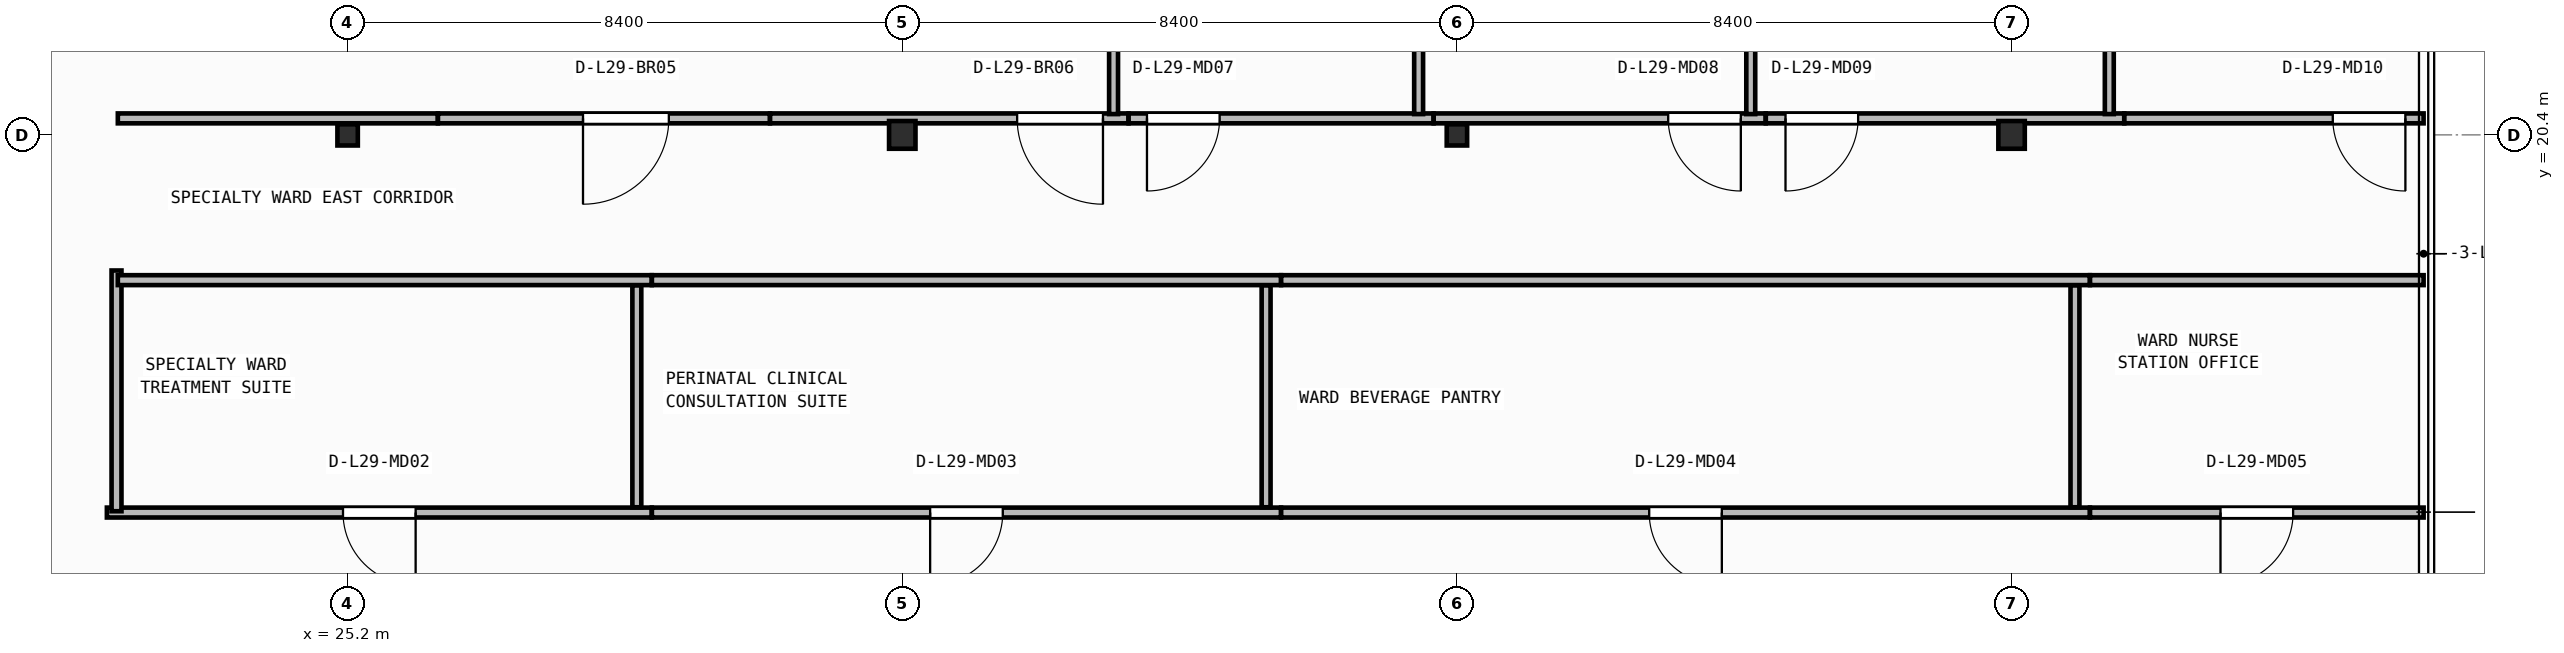
"""IFC4 building model, lengths in metres.
Left out: names, types, materials, properties, quantities, classifications, styles, units other than length and angle.
Written with IfcOpenShell. Run it as: python <this file> out.ifc"""

import sys

from ifc_helpers import new_model, si_unit, direction, frame, frame_2d, origin, origin_2d, place, context, subcontext, project, spatial, rectangle, i_section, extrude, element, fill, save


model = new_model("IFC4")
c1 = context("Model", 3, precision=1e-05, world=origin(), true_north=direction((0.0, 1.0)))
c2 = subcontext(c1, "Body", "Model", "MODEL_VIEW")
j1 = project(units=[si_unit("LENGTHUNIT", "METRE"), si_unit("PLANEANGLEUNIT", "RADIAN")], contexts=[c1])
p1 = place(None, origin())
s1 = spatial("IfcSite", under=j1, at=p1, CompositionType="ELEMENT")
p2 = place(p1, origin())
s2 = spatial("IfcBuilding", under=s1, at=p2, CompositionType="ELEMENT")
p3 = place(p2, frame((0.0, 0.0, 119.15)))
s3 = spatial("IfcBuildingStorey", under=s2, at=p3, CompositionType="ELEMENT", Elevation=119.15)
p4 = place(p3, frame((25.2, 20.4, 0.0), z_axis=(0.0, 0.0, 1.0), x_axis=(1.0, 0.0, 0.0)))
e1 = element("IfcColumn", 1, at=p4, inside=s3, PredefinedType="COLUMN", context=c2, shape_type="SweptSolid", body=[
    extrude(i_section(OverallWidth=0.309, OverallDepth=0.321, WebThickness=0.014, FlangeThickness=0.022, FilletRadius=0.017, at=origin_2d()), origin(), (0.0, 0.0, 1.0), 3.95),
])
p5 = place(p3, frame((33.6, 20.4, 0.0), z_axis=(0.0, 0.0, 1.0), x_axis=(1.0, 0.0, 0.0)))
e2 = element("IfcColumn", 2, at=p5, inside=s3, PredefinedType="COLUMN", context=c2, shape_type="SweptSolid", body=[
    extrude(i_section(OverallWidth=0.4, OverallDepth=0.42, WebThickness=0.025, FlangeThickness=0.04, at=origin_2d()), origin(), (0.0, 0.0, 1.0), 3.95),
])
p6 = place(p3, frame((42.0, 20.4, 0.0), z_axis=(0.0, 0.0, 1.0), x_axis=(1.0, 0.0, 0.0)))
e3 = element("IfcColumn", 3, at=p6, inside=s3, PredefinedType="COLUMN", context=c2, shape_type="SweptSolid", body=[
    extrude(i_section(OverallWidth=0.309, OverallDepth=0.321, WebThickness=0.014, FlangeThickness=0.022, FilletRadius=0.017, at=origin_2d()), origin(), (0.0, 0.0, 1.0), 3.95),
])
p7 = place(p3, frame((50.4, 20.4, 0.0), z_axis=(0.0, 0.0, 1.0), x_axis=(1.0, 0.0, 0.0)))
e4 = element("IfcColumn", 4, at=p7, inside=s3, PredefinedType="COLUMN", context=c2, shape_type="SweptSolid", body=[
    extrude(i_section(OverallWidth=0.4, OverallDepth=0.42, WebThickness=0.025, FlangeThickness=0.04, at=origin_2d()), origin(), (0.0, 0.0, 1.0), 3.95),
])
p8 = place(p3, frame((29.806, 14.68, 0.0), z_axis=(0.0, 0.0, 1.0), x_axis=(-1.0, 0.0, 0.0)))
e5 = element("IfcWall", 5, at=p8, inside=s3, PredefinedType="PARTITIONING", context=c2, shape_type="SweptSolid", body=[
    extrude(rectangle(XDim=8.252, YDim=0.15, at=frame_2d((4.126, 0.0))), origin(), (0.0, 0.0, 1.0), 3.71),
])
p9 = place(p8, frame((3.576, 0.0, 0.0)))
e6 = element("IfcOpeningElement", 6, at=p9, cuts=e5, PredefinedType="OPENING", context=c2, shape_type="SweptSolid", body=[
    extrude(rectangle(XDim=1.1, YDim=2.1, at=frame_2d((0.55, 1.05))), frame((0.0, 0.085, 0.0), z_axis=(0.0, -1.0, 0.0), x_axis=(1.0, 0.0, 0.0)), (0.0, 0.0, 1.0), 0.17),
])
p10 = place(p3, frame((39.336, 14.68, 0.0), z_axis=(0.0, 0.0, 1.0), x_axis=(-1.0, 0.0, 0.0)))
e7 = element("IfcWall", 7, at=p10, inside=s3, PredefinedType="PARTITIONING", context=c2, shape_type="SweptSolid", body=[
    extrude(rectangle(XDim=9.528, YDim=0.15, at=frame_2d((4.764, 0.0))), origin(), (0.0, 0.0, 1.0), 3.71),
])
p11 = place(p10, frame((4.214, 0.0, 0.0)))
e8 = element("IfcOpeningElement", 8, at=p11, cuts=e7, PredefinedType="OPENING", context=c2, shape_type="SweptSolid", body=[
    extrude(rectangle(XDim=1.1, YDim=2.1, at=frame_2d((0.55, 1.05))), frame((0.0, 0.085, 0.0), z_axis=(0.0, -1.0, 0.0), x_axis=(1.0, 0.0, 0.0)), (0.0, 0.0, 1.0), 0.17),
])
p12 = place(p3, frame((51.586, 14.68, 0.0), z_axis=(0.0, 0.0, 1.0), x_axis=(-1.0, 0.0, 0.0)))
e9 = element("IfcWall", 9, at=p12, inside=s3, PredefinedType="PARTITIONING", context=c2, shape_type="SweptSolid", body=[
    extrude(rectangle(XDim=12.248, YDim=0.15, at=frame_2d((6.124, 0.0))), origin(), (0.0, 0.0, 1.0), 3.71),
])
p13 = place(p12, frame((5.574, 0.0, 0.0)))
e10 = element("IfcOpeningElement", 10, at=p13, cuts=e9, PredefinedType="OPENING", context=c2, shape_type="SweptSolid", body=[
    extrude(rectangle(XDim=1.1, YDim=2.1, at=frame_2d((0.55, 1.05))), frame((0.0, 0.085, 0.0), z_axis=(0.0, -1.0, 0.0), x_axis=(1.0, 0.0, 0.0)), (0.0, 0.0, 1.0), 0.17),
])
p14 = place(p3, frame((56.64, 14.68, 0.0), z_axis=(0.0, 0.0, 1.0), x_axis=(-1.0, 0.0, 0.0)))
e11 = element("IfcWall", 11, at=p14, inside=s3, PredefinedType="PARTITIONING", context=c2, shape_type="SweptSolid", body=[
    extrude(rectangle(XDim=5.052, YDim=0.15, at=frame_2d((2.526, 0.0))), origin(), (0.0, 0.0, 1.0), 3.71),
])
p15 = place(p14, frame((1.976, 0.0, 0.0)))
e12 = element("IfcOpeningElement", 12, at=p15, cuts=e11, PredefinedType="OPENING", context=c2, shape_type="SweptSolid", body=[
    extrude(rectangle(XDim=1.1, YDim=2.1, at=frame_2d((0.55, 1.05))), frame((0.0, 0.085, 0.0), z_axis=(0.0, -1.0, 0.0), x_axis=(1.0, 0.0, 0.0)), (0.0, 0.0, 1.0), 0.17),
])
p16 = place(p3, frame((21.7, 14.7, 0.0), z_axis=(0.0, 0.0, 1.0), x_axis=(0.0, 1.0, 0.0)))
e13 = element("IfcWall", 13, at=p16, inside=s3, PredefinedType="PARTITIONING", context=c2, shape_type="SweptSolid", body=[
    extrude(rectangle(XDim=3.646, YDim=0.15, at=frame_2d((1.823, 0.0))), origin(), (0.0, 0.0, 1.0), 3.71),
])
p17 = place(p3, frame((21.72, 18.2, 0.0), z_axis=(0.0, 0.0, 1.0), x_axis=(1.0, 0.0, 0.0)))
e14 = element("IfcWall", 14, at=p17, inside=s3, PredefinedType="PARTITIONING", context=c2, shape_type="SweptSolid", body=[
    extrude(rectangle(XDim=8.086, YDim=0.15, at=frame_2d((4.043, 0.0))), origin(), (0.0, 0.0, 1.0), 3.71),
])
p18 = place(p3, frame((29.808, 18.2, 0.0), z_axis=(0.0, 0.0, 1.0), x_axis=(1.0, 0.0, 0.0)))
e15 = element("IfcWall", 15, at=p18, inside=s3, PredefinedType="PARTITIONING", context=c2, shape_type="SweptSolid", body=[
    extrude(rectangle(XDim=9.528, YDim=0.15, at=frame_2d((4.764, 0.0))), origin(), (0.0, 0.0, 1.0), 3.71),
])
p19 = place(p3, frame((39.338, 18.2, 0.0), z_axis=(0.0, 0.0, 1.0), x_axis=(1.0, 0.0, 0.0)))
e16 = element("IfcWall", 16, at=p19, inside=s3, PredefinedType="PARTITIONING", context=c2, shape_type="SweptSolid", body=[
    extrude(rectangle(XDim=12.248, YDim=0.15, at=frame_2d((6.124, 0.0))), origin(), (0.0, 0.0, 1.0), 3.71),
])
p20 = place(p3, frame((51.588, 18.2, 0.0), z_axis=(0.0, 0.0, 1.0), x_axis=(1.0, 0.0, 0.0)))
e17 = element("IfcWall", 17, at=p20, inside=s3, PredefinedType="PARTITIONING", context=c2, shape_type="SweptSolid", body=[
    extrude(rectangle(XDim=5.052, YDim=0.15, at=frame_2d((2.526, 0.0))), origin(), (0.0, 0.0, 1.0), 3.71),
])
p21 = place(p3, frame((26.566, 20.65, 0.0), z_axis=(0.0, 0.0, 1.0), x_axis=(-1.0, 0.0, 0.0)))
e18 = element("IfcWall", 18, at=p21, inside=s3, PredefinedType="PARTITIONING", context=c2, shape_type="SweptSolid", body=[
    extrude(rectangle(XDim=4.846, YDim=0.15, at=frame_2d((2.423, 0.0))), origin(), (0.0, 0.0, 1.0), 3.083),
])
p22 = place(p3, frame((31.596, 20.65, 0.0), z_axis=(0.0, 0.0, 1.0), x_axis=(-1.0, 0.0, 0.0)))
e19 = element("IfcWall", 19, at=p22, inside=s3, PredefinedType="PARTITIONING", context=c2, shape_type="SweptSolid", body=[
    extrude(rectangle(XDim=5.028, YDim=0.15, at=frame_2d((2.514, 0.0))), origin(), (0.0, 0.0, 1.0), 3.083),
])
p23 = place(p22, frame((1.531, 0.0, 0.0)))
e20 = element("IfcOpeningElement", 20, at=p23, cuts=e19, PredefinedType="OPENING", context=c2, shape_type="SweptSolid", body=[
    extrude(rectangle(XDim=1.3, YDim=2.15, at=frame_2d((0.65, 1.075))), frame((0.0, 0.085, 0.0), z_axis=(0.0, -1.0, 0.0), x_axis=(1.0, 0.0, 0.0)), (0.0, 0.0, 1.0), 0.17),
])
p24 = place(p3, frame((37.026, 20.65, 0.0), z_axis=(0.0, 0.0, 1.0), x_axis=(-1.0, 0.0, 0.0)))
e21 = element("IfcWall", 21, at=p24, inside=s3, PredefinedType="PARTITIONING", context=c2, shape_type="SweptSolid", body=[
    extrude(rectangle(XDim=5.428, YDim=0.15, at=frame_2d((2.714, 0.0))), origin(), (0.0, 0.0, 1.0), 3.083),
])
p25 = place(p24, frame((0.386, 0.0, 0.0)))
e22 = element("IfcOpeningElement", 22, at=p25, cuts=e21, PredefinedType="OPENING", context=c2, shape_type="SweptSolid", body=[
    extrude(rectangle(XDim=1.3, YDim=2.15, at=frame_2d((0.65, 1.075))), frame((0.0, 0.085, 0.0), z_axis=(0.0, -1.0, 0.0), x_axis=(1.0, 0.0, 0.0)), (0.0, 0.0, 1.0), 0.17),
])
p26 = place(p3, frame((41.646, 20.65, 0.0), z_axis=(0.0, 0.0, 1.0), x_axis=(-1.0, 0.0, 0.0)))
e23 = element("IfcWall", 23, at=p26, inside=s3, PredefinedType="PARTITIONING", context=c2, shape_type="SweptSolid", body=[
    extrude(rectangle(XDim=4.618, YDim=0.15, at=frame_2d((2.309, 0.0))), origin(), (0.0, 0.0, 1.0), 3.083),
])
p27 = place(p26, frame((3.24, 0.0, 0.0)))
e24 = element("IfcOpeningElement", 24, at=p27, cuts=e23, PredefinedType="OPENING", context=c2, shape_type="SweptSolid", body=[
    extrude(rectangle(XDim=1.1, YDim=2.1, at=frame_2d((0.55, 1.05))), frame((0.0, 0.085, 0.0), z_axis=(0.0, -1.0, 0.0), x_axis=(1.0, 0.0, 0.0)), (0.0, 0.0, 1.0), 0.17),
])
p28 = place(p3, frame((46.676, 20.65, 0.0), z_axis=(0.0, 0.0, 1.0), x_axis=(-1.0, 0.0, 0.0)))
e25 = element("IfcWall", 25, at=p28, inside=s3, PredefinedType="PARTITIONING", context=c2, shape_type="SweptSolid", body=[
    extrude(rectangle(XDim=5.028, YDim=0.15, at=frame_2d((2.514, 0.0))), origin(), (0.0, 0.0, 1.0), 3.083),
])
p29 = place(p28, frame((0.376, 0.0, 0.0)))
e26 = element("IfcOpeningElement", 26, at=p29, cuts=e25, PredefinedType="OPENING", context=c2, shape_type="SweptSolid", body=[
    extrude(rectangle(XDim=1.1, YDim=2.1, at=frame_2d((0.55, 1.05))), frame((0.0, 0.085, 0.0), z_axis=(0.0, -1.0, 0.0), x_axis=(1.0, 0.0, 0.0)), (0.0, 0.0, 1.0), 0.17),
])
p30 = place(p3, frame((52.106, 20.65, 0.0), z_axis=(0.0, 0.0, 1.0), x_axis=(-1.0, 0.0, 0.0)))
e27 = element("IfcWall", 27, at=p30, inside=s3, PredefinedType="PARTITIONING", context=c2, shape_type="SweptSolid", body=[
    extrude(rectangle(XDim=5.428, YDim=0.15, at=frame_2d((2.714, 0.0))), origin(), (0.0, 0.0, 1.0), 3.083),
])
p31 = place(p30, frame((4.03, 0.0, 0.0)))
e28 = element("IfcOpeningElement", 28, at=p31, cuts=e27, PredefinedType="OPENING", context=c2, shape_type="SweptSolid", body=[
    extrude(rectangle(XDim=1.1, YDim=2.1, at=frame_2d((0.55, 1.05))), frame((0.0, 0.085, 0.0), z_axis=(0.0, -1.0, 0.0), x_axis=(1.0, 0.0, 0.0)), (0.0, 0.0, 1.0), 0.17),
])
p32 = place(p3, frame((56.64, 20.65, 0.0), z_axis=(0.0, 0.0, 1.0), x_axis=(-1.0, 0.0, 0.0)))
e29 = element("IfcWall", 29, at=p32, inside=s3, PredefinedType="PARTITIONING", context=c2, shape_type="SweptSolid", body=[
    extrude(rectangle(XDim=4.532, YDim=0.15, at=frame_2d((2.266, 0.0))), origin(), (0.0, 0.0, 1.0), 3.71),
])
p33 = place(p32, frame((0.276, 0.0, 0.0)))
e30 = element("IfcOpeningElement", 30, at=p33, cuts=e29, PredefinedType="OPENING", context=c2, shape_type="SweptSolid", body=[
    extrude(rectangle(XDim=1.1, YDim=2.1, at=frame_2d((0.55, 1.05))), frame((0.0, 0.085, 0.0), z_axis=(0.0, -1.0, 0.0), x_axis=(1.0, 0.0, 0.0)), (0.0, 0.0, 1.0), 0.17),
])
for number, where, z_axis, x_axis in (
    (31, (29.58, 14.76, 0.0), (0.0, 0.0, 1.0), (0.0, 1.0, 0.0)),
    (32, (39.11, 14.76, 0.0), (0.0, 0.0, 1.0), (0.0, 1.0, 0.0)),
    (33, (51.36, 14.76, 0.0), (0.0, 0.0, 1.0), (0.0, 1.0, 0.0)),
):
    element("IfcWall", number, at=place(p3, frame(where, z_axis=z_axis, x_axis=x_axis)), inside=s3, PredefinedType="PARTITIONING", context=c2, shape_type="SweptSolid", body=[
        extrude(rectangle(XDim=3.36, YDim=0.135, at=frame_2d((1.68, 0.0))), origin(), (0.0, 0.0, 1.0), 3.71),
    ])
for number, where, z_axis, x_axis in (
    (34, (36.8, 20.715, 0.0), (0.0, 0.0, 1.0), (0.0, 1.0, 0.0)),
    (35, (41.42, 20.715, 0.0), (0.0, 0.0, 1.0), (0.0, 1.0, 0.0)),
    (36, (46.45, 20.715, 0.0), (0.0, 0.0, 1.0), (0.0, 1.0, 0.0)),
    (37, (51.88, 20.715, 0.0), (0.0, 0.0, 1.0), (0.0, 1.0, 0.0)),
):
    element("IfcWall", number, at=place(p3, frame(where, z_axis=z_axis, x_axis=x_axis)), inside=s3, PredefinedType="PARTITIONING", context=c2, shape_type="SweptSolid", body=[
        extrude(rectangle(XDim=6.385, YDim=0.135, at=frame_2d((3.192, 0.0))), origin(), (0.0, 0.0, 1.0), 3.71),
    ])
p34 = place(p9, origin())
e38 = element("IfcDoor", 38, at=p34, inside=s3, OperationType="SINGLE_SWING_LEFT", PredefinedType="DOOR", context=c2, shape_type="SweptSolid", body=[
    extrude(rectangle(XDim=1.1, YDim=2.1, at=frame_2d((0.55, 1.05))), frame((0.0, 0.025, 0.0), z_axis=(0.0, -1.0, 0.0), x_axis=(1.0, 0.0, 0.0)), (0.0, 0.0, 1.0), 0.05),
])
fill(e6, e38)
p35 = place(p11, origin())
e39 = element("IfcDoor", 39, at=p35, inside=s3, OperationType="SINGLE_SWING_RIGHT", PredefinedType="DOOR", context=c2, shape_type="SweptSolid", body=[
    extrude(rectangle(XDim=1.1, YDim=2.1, at=frame_2d((0.55, 1.05))), frame((0.0, 0.025, 0.0), z_axis=(0.0, -1.0, 0.0), x_axis=(1.0, 0.0, 0.0)), (0.0, 0.0, 1.0), 0.05),
])
fill(e8, e39)
p36 = place(p13, origin())
e40 = element("IfcDoor", 40, at=p36, inside=s3, OperationType="SINGLE_SWING_LEFT", PredefinedType="DOOR", context=c2, shape_type="SweptSolid", body=[
    extrude(rectangle(XDim=1.1, YDim=2.1, at=frame_2d((0.55, 1.05))), frame((0.0, 0.025, 0.0), z_axis=(0.0, -1.0, 0.0), x_axis=(1.0, 0.0, 0.0)), (0.0, 0.0, 1.0), 0.05),
])
fill(e10, e40)
p37 = place(p15, origin())
e41 = element("IfcDoor", 41, at=p37, inside=s3, OperationType="SINGLE_SWING_RIGHT", PredefinedType="DOOR", context=c2, shape_type="SweptSolid", body=[
    extrude(rectangle(XDim=1.1, YDim=2.1, at=frame_2d((0.55, 1.05))), frame((0.0, 0.025, 0.0), z_axis=(0.0, -1.0, 0.0), x_axis=(1.0, 0.0, 0.0)), (0.0, 0.0, 1.0), 0.05),
])
fill(e12, e41)
p38 = place(p23, origin())
e42 = element("IfcDoor", 42, at=p38, inside=s3, OperationType="SINGLE_SWING_RIGHT", PredefinedType="DOOR", context=c2, shape_type="SweptSolid", body=[
    extrude(rectangle(XDim=1.3, YDim=2.15, at=frame_2d((0.65, 1.075))), frame((0.0, 0.025, 0.0), z_axis=(0.0, -1.0, 0.0), x_axis=(1.0, 0.0, 0.0)), (0.0, 0.0, 1.0), 0.05),
])
fill(e20, e42)
p39 = place(p25, origin())
e43 = element("IfcDoor", 43, at=p39, inside=s3, OperationType="SINGLE_SWING_LEFT", PredefinedType="DOOR", context=c2, shape_type="SweptSolid", body=[
    extrude(rectangle(XDim=1.3, YDim=2.15, at=frame_2d((0.65, 1.075))), frame((0.0, 0.025, 0.0), z_axis=(0.0, -1.0, 0.0), x_axis=(1.0, 0.0, 0.0)), (0.0, 0.0, 1.0), 0.05),
])
fill(e22, e43)
p40 = place(p27, origin())
e44 = element("IfcDoor", 44, at=p40, inside=s3, OperationType="SINGLE_SWING_RIGHT", PredefinedType="DOOR", context=c2, shape_type="SweptSolid", body=[
    extrude(rectangle(XDim=1.1, YDim=2.1, at=frame_2d((0.55, 1.05))), frame((0.0, 0.025, 0.0), z_axis=(0.0, -1.0, 0.0), x_axis=(1.0, 0.0, 0.0)), (0.0, 0.0, 1.0), 0.05),
])
fill(e24, e44)
p41 = place(p29, origin())
e45 = element("IfcDoor", 45, at=p41, inside=s3, OperationType="SINGLE_SWING_LEFT", PredefinedType="DOOR", context=c2, shape_type="SweptSolid", body=[
    extrude(rectangle(XDim=1.1, YDim=2.1, at=frame_2d((0.55, 1.05))), frame((0.0, 0.025, 0.0), z_axis=(0.0, -1.0, 0.0), x_axis=(1.0, 0.0, 0.0)), (0.0, 0.0, 1.0), 0.05),
])
fill(e26, e45)
p42 = place(p31, origin())
e46 = element("IfcDoor", 46, at=p42, inside=s3, OperationType="SINGLE_SWING_RIGHT", PredefinedType="DOOR", context=c2, shape_type="SweptSolid", body=[
    extrude(rectangle(XDim=1.1, YDim=2.1, at=frame_2d((0.55, 1.05))), frame((0.0, 0.025, 0.0), z_axis=(0.0, -1.0, 0.0), x_axis=(1.0, 0.0, 0.0)), (0.0, 0.0, 1.0), 0.05),
])
fill(e28, e46)
p43 = place(p33, origin())
e47 = element("IfcDoor", 47, at=p43, inside=s3, OperationType="SINGLE_SWING_LEFT", PredefinedType="DOOR", context=c2, shape_type="SweptSolid", body=[
    extrude(rectangle(XDim=1.1, YDim=2.1, at=frame_2d((0.55, 1.05))), frame((0.0, 0.025, 0.0), z_axis=(0.0, -1.0, 0.0), x_axis=(1.0, 0.0, 0.0)), (0.0, 0.0, 1.0), 0.05),
])
fill(e30, e47)
save(model, sys.argv[1])
